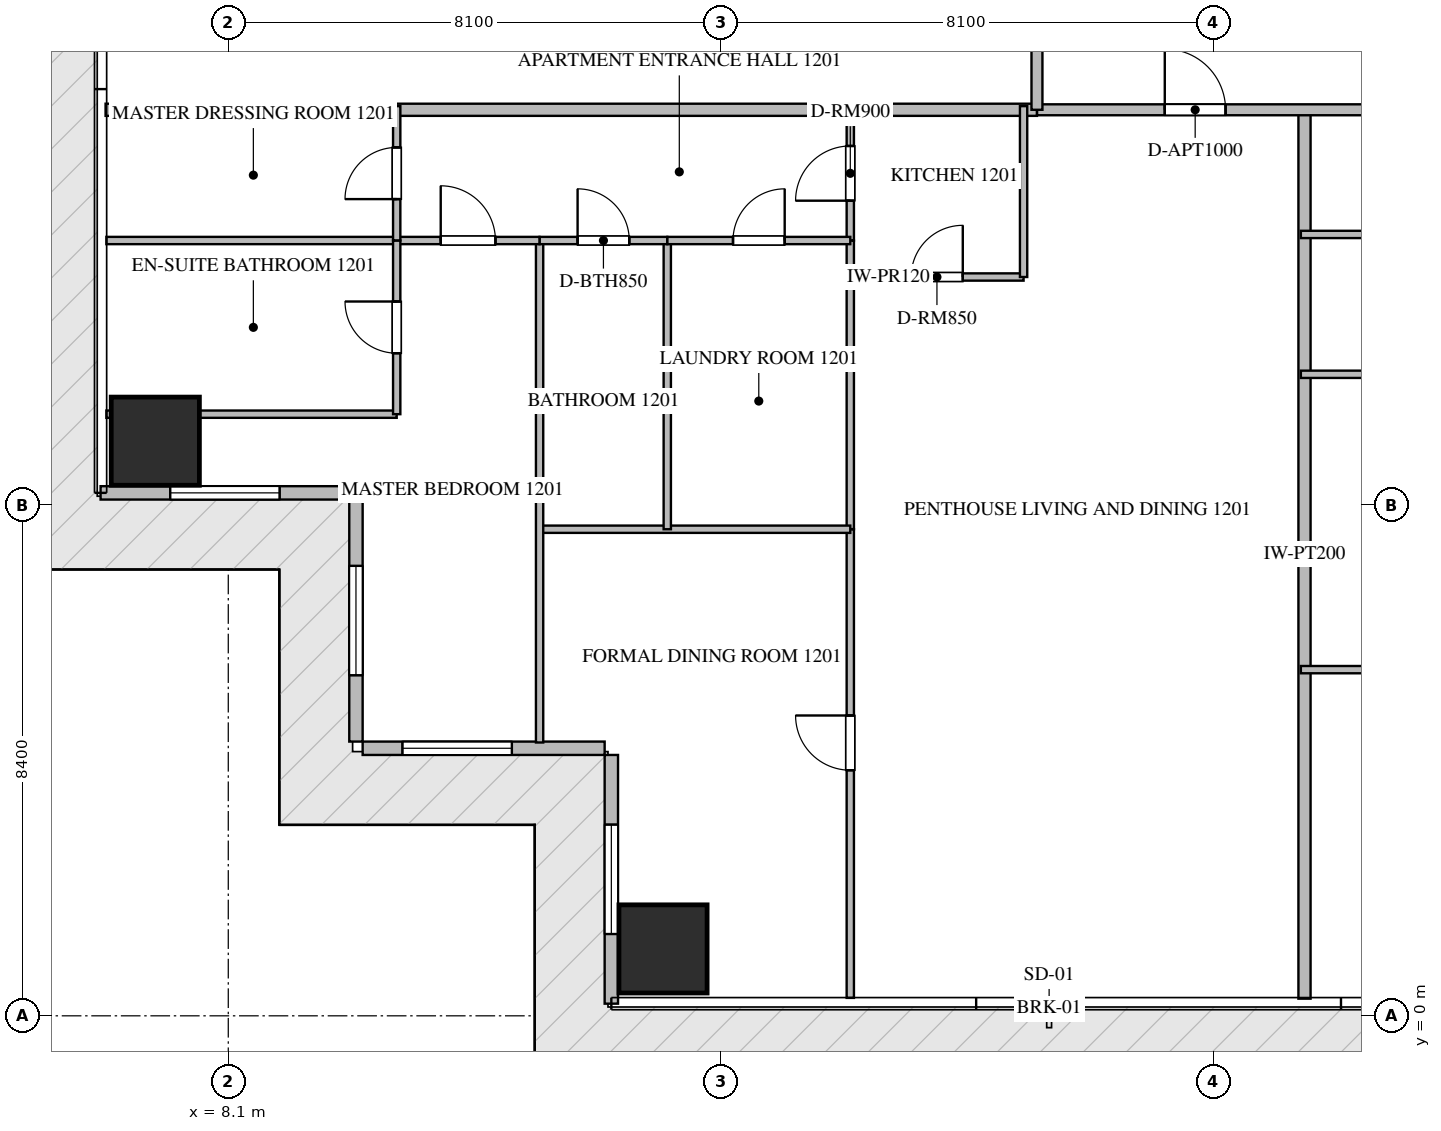
"""IFC4 building model, lengths in metres.
Left out: names, types, materials, properties, quantities, classifications, styles, units other than length and angle.
Written with IfcOpenShell. Run it as: python <this file> out.ifc"""

import sys

from ifc_helpers import new_model, si_unit, direction, frame, frame_2d, origin, origin_2d, place, context, subcontext, project, spatial, rectangle, extrude, source, transform, mapped, element, fill, save


model = new_model("IFC4")
c1 = context("Model", 3, precision=1e-05, world=origin(), true_north=direction((0.0, 1.0)))
c2 = subcontext(c1, "Body", "Model", "MODEL_VIEW")
j1 = project(units=[si_unit("LENGTHUNIT", "METRE"), si_unit("PLANEANGLEUNIT", "RADIAN")], contexts=[c1])
p1 = place(None, origin())
s1 = spatial("IfcSite", under=j1, at=p1, CompositionType="ELEMENT")
p2 = place(p1, origin())
s2 = spatial("IfcBuilding", under=s1, at=p2, CompositionType="ELEMENT")
p3 = place(p2, frame((0.0, 0.0, 52.95)))
s3 = spatial("IfcBuildingStorey", under=s2, at=p3, CompositionType="ELEMENT", Elevation=52.95)
m1 = source(origin(), c2, "Body", "SweptSolid", [
    extrude(rectangle(XDim=1.45, YDim=1.45, at=origin_2d()), origin(), (0.0, 0.0, 1.0), 3.75),
])
for number, where, z_axis, x_axis in (
    (1, (15.25, 1.1, -0.26), (0.0, 0.0, 1.0), (1.0, 0.0, 0.0)),
    (2, (6.9, 9.45, -0.26), (0.0, 0.0, 1.0), (1.0, 0.0, 0.0)),
):
    element("IfcColumn", number, at=place(p3, frame(where, z_axis=z_axis, x_axis=x_axis)), inside=s3, PredefinedType="COLUMN", context=c2, shape_type="MappedRepresentation", body=[
        mapped(m1, transform((0.0, 0.0, 0.0), scale=1.0)),
    ])
p4 = place(p3, frame((6.0, 8.6, 0.0), z_axis=(0.0, 0.0, 1.0), x_axis=(1.0, 0.0, 0.0)))
e3 = element("IfcWall", 3, at=p4, inside=s3, PredefinedType="ELEMENTEDWALL", context=c2, shape_type="SweptSolid", body=[
    extrude(rectangle(XDim=4.09, YDim=0.22, at=frame_2d((2.045, 0.0))), origin(), (0.0, 0.0, 1.0), 3.475),
])
p5 = place(p4, frame((1.145, 0.0, 0.65)))
e4 = element("IfcOpeningElement", 4, at=p5, cuts=e3, PredefinedType="OPENING", context=c2, shape_type="SweptSolid", body=[
    extrude(rectangle(XDim=1.8, YDim=2.1, at=frame_2d((0.9, 1.05))), frame((0.0, 0.12, 0.0), z_axis=(0.0, -1.0, 0.0), x_axis=(1.0, 0.0, 0.0)), (0.0, 0.0, 1.0), 0.24),
])
p6 = place(p3, frame((10.2, 8.49, 0.0), z_axis=(0.0, 0.0, 1.0), x_axis=(0.0, -1.0, 0.0)))
e5 = element("IfcWall", 5, at=p6, inside=s3, PredefinedType="ELEMENTEDWALL", context=c2, shape_type="SweptSolid", body=[
    extrude(rectangle(XDim=3.98, YDim=0.22, at=frame_2d((1.99, 0.0))), origin(), (0.0, 0.0, 1.0), 3.475),
])
p7 = place(p6, frame((1.09, 0.0, 0.65)))
e6 = element("IfcOpeningElement", 6, at=p7, cuts=e5, PredefinedType="OPENING", context=c2, shape_type="SweptSolid", body=[
    extrude(rectangle(XDim=1.8, YDim=2.1, at=frame_2d((0.9, 1.05))), frame((0.0, 0.12, 0.0), z_axis=(0.0, -1.0, 0.0), x_axis=(1.0, 0.0, 0.0)), (0.0, 0.0, 1.0), 0.24),
])
p8 = place(p3, frame((10.31, 4.4, 0.0), z_axis=(0.0, 0.0, 1.0), x_axis=(1.0, 0.0, 0.0)))
e7 = element("IfcWall", 7, at=p8, inside=s3, PredefinedType="ELEMENTEDWALL", context=c2, shape_type="SweptSolid", body=[
    extrude(rectangle(XDim=3.98, YDim=0.22, at=frame_2d((1.99, 0.0))), origin(), (0.0, 0.0, 1.0), 3.475),
])
p9 = place(p8, frame((0.654, 0.0, 0.65)))
e8 = element("IfcOpeningElement", 8, at=p9, cuts=e7, PredefinedType="OPENING", context=c2, shape_type="SweptSolid", body=[
    extrude(rectangle(XDim=1.8, YDim=2.1, at=frame_2d((0.9, 1.05))), frame((0.0, 0.12, 0.0), z_axis=(0.0, -1.0, 0.0), x_axis=(1.0, 0.0, 0.0)), (0.0, 0.0, 1.0), 0.24),
])
p10 = place(p3, frame((14.4, 4.29, 0.0), z_axis=(0.0, 0.0, 1.0), x_axis=(0.0, -1.0, 0.0)))
e9 = element("IfcWall", 9, at=p10, inside=s3, PredefinedType="ELEMENTEDWALL", context=c2, shape_type="SweptSolid", body=[
    extrude(rectangle(XDim=4.09, YDim=0.22, at=frame_2d((2.045, 0.0))), origin(), (0.0, 0.0, 1.0), 3.475),
])
p11 = place(p10, frame((1.145, 0.0, 0.65)))
e10 = element("IfcOpeningElement", 10, at=p11, cuts=e9, PredefinedType="OPENING", context=c2, shape_type="SweptSolid", body=[
    extrude(rectangle(XDim=1.8, YDim=2.1, at=frame_2d((0.9, 1.05))), frame((0.0, 0.12, 0.0), z_axis=(0.0, -1.0, 0.0), x_axis=(1.0, 0.0, 0.0)), (0.0, 0.0, 1.0), 0.24),
])
p12 = place(p3, frame((25.8, 0.282, 0.0), z_axis=(0.0, 0.0, 1.0), x_axis=(0.0, 1.0, 0.0)))
e11 = element("IfcWall", 11, at=p12, inside=s3, PredefinedType="PARTITIONING", context=c2, shape_type="SweptSolid", body=[
    extrude(rectangle(XDim=14.618, YDim=0.2, at=frame_2d((7.309, 0.0))), origin(), (0.0, 0.0, 1.0), 3.49),
])
p13 = place(p3, frame((6.082, 14.9, 0.0), z_axis=(0.0, 0.0, 1.0), x_axis=(1.0, 0.0, 0.0)))
e12 = element("IfcWall", 12, at=p13, inside=s3, PredefinedType="PARTITIONING", context=c2, shape_type="SweptSolid", body=[
    extrude(rectangle(XDim=15.318, YDim=0.2, at=frame_2d((7.659, 0.0))), origin(), (0.0, 0.0, 1.0), 3.49),
])
p14 = place(p3, frame((21.402, 14.9, 0.0), z_axis=(0.0, 0.0, 1.0), x_axis=(1.0, 0.0, 0.0)))
e13 = element("IfcWall", 13, at=p14, inside=s3, PredefinedType="PARTITIONING", context=c2, shape_type="SweptSolid", body=[
    extrude(rectangle(XDim=21.996, YDim=0.18, at=frame_2d((10.998, 0.0))), origin(), (0.0, 0.0, 1.0), 3.49),
])
p15 = place(p14, frame((2.1, 0.0, 0.0)))
e14 = element("IfcOpeningElement", 14, at=p15, cuts=e13, PredefinedType="OPENING", context=c2, shape_type="SweptSolid", body=[
    extrude(rectangle(XDim=1.0, YDim=2.15, at=frame_2d((0.5, 1.075))), frame((0.0, 0.1, 0.0), z_axis=(0.0, -1.0, 0.0), x_axis=(1.0, 0.0, 0.0)), (0.0, 0.0, 1.0), 0.2),
])
p16 = place(p14, frame((14.172, 0.0, 0.0)))
e15 = element("IfcOpeningElement", 15, at=p16, cuts=e13, PredefinedType="OPENING", context=c2, shape_type="SweptSolid", body=[
    extrude(rectangle(XDim=1.0, YDim=2.15, at=frame_2d((0.5, 1.075))), frame((0.0, 0.1, 0.0), z_axis=(0.0, -1.0, 0.0), x_axis=(1.0, 0.0, 0.0)), (0.0, 0.0, 1.0), 0.2),
])
p17 = place(p14, frame((18.896, 0.0, 0.0)))
e16 = element("IfcOpeningElement", 16, at=p17, cuts=e13, PredefinedType="OPENING", context=c2, shape_type="SweptSolid", body=[
    extrude(rectangle(XDim=1.0, YDim=2.15, at=frame_2d((0.5, 1.075))), frame((0.0, 0.1, 0.0), z_axis=(0.0, -1.0, 0.0), x_axis=(1.0, 0.0, 0.0)), (0.0, 0.0, 1.0), 0.2),
])
p18 = place(p3, frame((21.4, 14.9, 0.0), z_axis=(0.0, 0.0, 1.0), x_axis=(0.0, 1.0, 0.0)))
e17 = element("IfcWall", 17, at=p18, inside=s3, PredefinedType="PARTITIONING", context=c2, shape_type="SweptSolid", body=[
    extrude(rectangle(XDim=20.6, YDim=0.18, at=frame_2d((10.3, 0.0))), origin(), (0.0, 0.0, 1.0), 3.49),
])
p19 = place(p18, frame((1.96, 0.0, 0.0)))
e18 = element("IfcOpeningElement", 18, at=p19, cuts=e17, PredefinedType="OPENING", context=c2, shape_type="SweptSolid", body=[
    extrude(rectangle(XDim=1.0, YDim=2.15, at=frame_2d((0.5, 1.075))), frame((0.0, 0.1, 0.0), z_axis=(0.0, -1.0, 0.0), x_axis=(1.0, 0.0, 0.0)), (0.0, 0.0, 1.0), 0.2),
])
p20 = place(p3, frame((18.33, 12.15, 0.0), z_axis=(0.0, 0.0, 1.0), x_axis=(1.0, 0.0, 0.0)))
e19 = element("IfcWall", 19, at=p20, inside=s3, PredefinedType="PARTITIONING", context=c2, shape_type="SweptSolid", body=[
    extrude(rectangle(XDim=2.85, YDim=0.12, at=frame_2d((1.425, 0.0))), origin(), (0.0, 0.0, 1.0), 3.49),
])
p21 = place(p20, frame((1.0, 0.0, 0.0)))
e20 = element("IfcOpeningElement", 20, at=p21, cuts=e19, PredefinedType="OPENING", context=c2, shape_type="SweptSolid", body=[
    extrude(rectangle(XDim=0.85, YDim=2.1, at=frame_2d((0.425, 1.05))), frame((0.0, 0.07, 0.0), z_axis=(0.0, -1.0, 0.0), x_axis=(1.0, 0.0, 0.0)), (0.0, 0.0, 1.0), 0.14),
])
p22 = place(p3, frame((21.18, 12.15, 0.0), z_axis=(0.0, 0.0, 1.0), x_axis=(0.0, 1.0, 0.0)))
e21 = element("IfcWall", 21, at=p22, inside=s3, PredefinedType="PARTITIONING", context=c2, shape_type="SweptSolid", body=[
    extrude(rectangle(XDim=2.81, YDim=0.12, at=frame_2d((1.405, 0.0))), origin(), (0.0, 0.0, 1.0), 3.49),
])
p23 = place(p3, frame((18.33, 12.75, 0.0), z_axis=(0.0, 0.0, 1.0), x_axis=(0.0, 1.0, 0.0)))
e22 = element("IfcWall", 22, at=p23, inside=s3, PredefinedType="PARTITIONING", context=c2, shape_type="SweptSolid", body=[
    extrude(rectangle(XDim=2.21, YDim=0.12, at=frame_2d((1.105, 0.0))), origin(), (0.0, 0.0, 1.0), 3.49),
])
p24 = place(p23, frame((0.655, 0.0, 0.0)))
e23 = element("IfcOpeningElement", 23, at=p24, cuts=e22, PredefinedType="OPENING", context=c2, shape_type="SweptSolid", body=[
    extrude(rectangle(XDim=0.9, YDim=2.1, at=frame_2d((0.45, 1.05))), frame((0.0, 0.07, 0.0), z_axis=(0.0, -1.0, 0.0), x_axis=(1.0, 0.0, 0.0)), (0.0, 0.0, 1.0), 0.14),
])
p25 = place(p3, frame((18.33, 0.295, 0.0), z_axis=(0.0, 0.0, 1.0), x_axis=(0.0, 1.0, 0.0)))
e24 = element("IfcWall", 24, at=p25, inside=s3, PredefinedType="PARTITIONING", context=c2, shape_type="SweptSolid", body=[
    extrude(rectangle(XDim=7.707, YDim=0.12, at=frame_2d((3.854, 0.0))), origin(), (0.0, 0.0, 1.0), 3.49),
])
p26 = place(p25, frame((3.744, 0.0, 0.0)))
e25 = element("IfcOpeningElement", 25, at=p26, cuts=e24, PredefinedType="OPENING", context=c2, shape_type="SweptSolid", body=[
    extrude(rectangle(XDim=0.9, YDim=2.1, at=frame_2d((0.45, 1.05))), frame((0.0, 0.07, 0.0), z_axis=(0.0, -1.0, 0.0), x_axis=(1.0, 0.0, 0.0)), (0.0, 0.0, 1.0), 0.14),
])
p27 = place(p3, frame((18.33, 8.004, 0.0), z_axis=(0.0, 0.0, 1.0), x_axis=(0.0, 1.0, 0.0)))
e26 = element("IfcWall", 26, at=p27, inside=s3, PredefinedType="PARTITIONING", context=c2, shape_type="SweptSolid", body=[
    extrude(rectangle(XDim=4.744, YDim=0.12, at=frame_2d((2.372, 0.0))), origin(), (0.0, 0.0, 1.0), 3.49),
])
p28 = place(p3, frame((13.22, 8.002, 0.0), z_axis=(0.0, 0.0, 1.0), x_axis=(1.0, 0.0, 0.0)))
e27 = element("IfcWall", 27, at=p28, inside=s3, PredefinedType="PARTITIONING", context=c2, shape_type="SweptSolid", body=[
    extrude(rectangle(XDim=5.11, YDim=0.12, at=frame_2d((2.555, 0.0))), origin(), (0.0, 0.0, 1.0), 3.49),
])
p29 = place(p3, frame((13.22, 4.495, 0.0), z_axis=(0.0, 0.0, 1.0), x_axis=(0.0, 1.0, 0.0)))
e28 = element("IfcWall", 28, at=p29, inside=s3, PredefinedType="PARTITIONING", context=c2, shape_type="SweptSolid", body=[
    extrude(rectangle(XDim=8.255, YDim=0.12, at=frame_2d((4.127, 0.0))), origin(), (0.0, 0.0, 1.0), 3.49),
])
p30 = place(p3, frame((15.32, 8.002, 0.0), z_axis=(0.0, 0.0, 1.0), x_axis=(0.0, 1.0, 0.0)))
e29 = element("IfcWall", 29, at=p30, inside=s3, PredefinedType="PARTITIONING", context=c2, shape_type="SweptSolid", body=[
    extrude(rectangle(XDim=4.748, YDim=0.12, at=frame_2d((2.374, 0.0))), origin(), (0.0, 0.0, 1.0), 2.922),
])
p31 = place(p3, frame((13.22, 12.75, 0.0), z_axis=(0.0, 0.0, 1.0), x_axis=(1.0, 0.0, 0.0)))
e30 = element("IfcWall", 30, at=p31, inside=s3, PredefinedType="PARTITIONING", context=c2, shape_type="SweptSolid", body=[
    extrude(rectangle(XDim=2.1, YDim=0.12, at=frame_2d((1.05, 0.0))), origin(), (0.0, 0.0, 1.0), 3.49),
])
p32 = place(p31, frame((0.625, 0.0, 0.0)))
e31 = element("IfcOpeningElement", 31, at=p32, cuts=e30, PredefinedType="OPENING", context=c2, shape_type="SweptSolid", body=[
    extrude(rectangle(XDim=0.85, YDim=2.1, at=frame_2d((0.425, 1.05))), frame((0.0, 0.07, 0.0), z_axis=(0.0, -1.0, 0.0), x_axis=(1.0, 0.0, 0.0)), (0.0, 0.0, 1.0), 0.14),
])
p33 = place(p3, frame((15.322, 12.75, 0.0), z_axis=(0.0, 0.0, 1.0), x_axis=(1.0, 0.0, 0.0)))
e32 = element("IfcWall", 32, at=p33, inside=s3, PredefinedType="PARTITIONING", context=c2, shape_type="SweptSolid", body=[
    extrude(rectangle(XDim=3.008, YDim=0.12, at=frame_2d((1.504, 0.0))), origin(), (0.0, 0.0, 1.0), 3.49),
])
p34 = place(p33, frame((1.079, 0.0, 0.0)))
e33 = element("IfcOpeningElement", 33, at=p34, cuts=e32, PredefinedType="OPENING", context=c2, shape_type="SweptSolid", body=[
    extrude(rectangle(XDim=0.85, YDim=2.1, at=frame_2d((0.425, 1.05))), frame((0.0, 0.07, 0.0), z_axis=(0.0, -1.0, 0.0), x_axis=(1.0, 0.0, 0.0)), (0.0, 0.0, 1.0), 0.14),
])
p35 = place(p3, frame((10.87, 12.75, 0.0), z_axis=(0.0, 0.0, 1.0), x_axis=(1.0, 0.0, 0.0)))
e34 = element("IfcWall", 34, at=p35, inside=s3, PredefinedType="PARTITIONING", context=c2, shape_type="SweptSolid", body=[
    extrude(rectangle(XDim=2.348, YDim=0.12, at=frame_2d((1.174, 0.0))), origin(), (0.0, 0.0, 1.0), 3.49),
])
p36 = place(p35, frame((0.724, 0.0, 0.0)))
e35 = element("IfcOpeningElement", 35, at=p36, cuts=e34, PredefinedType="OPENING", context=c2, shape_type="SweptSolid", body=[
    extrude(rectangle(XDim=0.9, YDim=2.1, at=frame_2d((0.45, 1.05))), frame((0.0, 0.07, 0.0), z_axis=(0.0, -1.0, 0.0), x_axis=(1.0, 0.0, 0.0)), (0.0, 0.0, 1.0), 0.14),
])
p37 = place(p3, frame((6.095, 9.894, 0.0), z_axis=(0.0, 0.0, 1.0), x_axis=(1.0, 0.0, 0.0)))
e36 = element("IfcWall", 36, at=p37, inside=s3, PredefinedType="PARTITIONING", context=c2, shape_type="SweptSolid", body=[
    extrude(rectangle(XDim=4.775, YDim=0.12, at=frame_2d((2.388, 0.0))), origin(), (0.0, 0.0, 1.0), 3.49),
])
p38 = place(p3, frame((6.095, 12.75, 0.0), z_axis=(0.0, 0.0, 1.0), x_axis=(1.0, 0.0, 0.0)))
e37 = element("IfcWall", 37, at=p38, inside=s3, PredefinedType="PARTITIONING", context=c2, shape_type="SweptSolid", body=[
    extrude(rectangle(XDim=4.773, YDim=0.12, at=frame_2d((2.386, 0.0))), origin(), (0.0, 0.0, 1.0), 3.49),
])
p39 = place(p3, frame((10.87, 9.894, 0.0), z_axis=(0.0, 0.0, 1.0), x_axis=(0.0, 1.0, 0.0)))
e38 = element("IfcWall", 38, at=p39, inside=s3, PredefinedType="PARTITIONING", context=c2, shape_type="SweptSolid", body=[
    extrude(rectangle(XDim=2.856, YDim=0.12, at=frame_2d((1.428, 0.0))), origin(), (0.0, 0.0, 1.0), 3.49),
])
p40 = place(p39, frame((1.003, 0.0, 0.0)))
e39 = element("IfcOpeningElement", 39, at=p40, cuts=e38, PredefinedType="OPENING", context=c2, shape_type="SweptSolid", body=[
    extrude(rectangle(XDim=0.85, YDim=2.1, at=frame_2d((0.425, 1.05))), frame((0.0, 0.07, 0.0), z_axis=(0.0, -1.0, 0.0), x_axis=(1.0, 0.0, 0.0)), (0.0, 0.0, 1.0), 0.14),
])
p41 = place(p3, frame((10.87, 12.752, 0.0), z_axis=(0.0, 0.0, 1.0), x_axis=(0.0, 1.0, 0.0)))
e40 = element("IfcWall", 40, at=p41, inside=s3, PredefinedType="PARTITIONING", context=c2, shape_type="SweptSolid", body=[
    extrude(rectangle(XDim=2.208, YDim=0.12, at=frame_2d((1.104, 0.0))), origin(), (0.0, 0.0, 1.0), 3.49),
])
p42 = place(p41, frame((0.679, 0.0, 0.0)))
e41 = element("IfcOpeningElement", 41, at=p42, cuts=e40, PredefinedType="OPENING", context=c2, shape_type="SweptSolid", body=[
    extrude(rectangle(XDim=0.85, YDim=2.1, at=frame_2d((0.425, 1.05))), frame((0.0, 0.07, 0.0), z_axis=(0.0, -1.0, 0.0), x_axis=(1.0, 0.0, 0.0)), (0.0, 0.0, 1.0), 0.14),
])
for number, where, z_axis, x_axis in (
    (42, (25.74, 5.693, 0.0), (0.0, 0.0, 1.0), (1.0, 0.0, 0.0)),
    (43, (25.74, 10.55, 0.0), (0.0, 0.0, 1.0), (1.0, 0.0, 0.0)),
    (44, (25.74, 12.85, 0.0), (0.0, 0.0, 1.0), (1.0, 0.0, 0.0)),
):
    element("IfcWall", number, at=place(p3, frame(where, z_axis=z_axis, x_axis=x_axis)), inside=s3, PredefinedType="PARTITIONING", context=c2, shape_type="SweptSolid", body=[
        extrude(rectangle(XDim=7.93, YDim=0.12, at=frame_2d((3.965, 0.0))), origin(), (0.0, 0.0, 1.0), 3.49),
    ])
m2 = source(origin(), c2, "Body", "SweptSolid", [
    extrude(rectangle(XDim=1.8, YDim=2.1, at=frame_2d((0.9, 1.05))), frame((0.0, 0.03, 0.0), z_axis=(0.0, -1.0, 0.0), x_axis=(1.0, 0.0, 0.0)), (0.0, 0.0, 1.0), 0.06),
])
p43 = place(p5, origin())
e45 = element("IfcWindow", 45, at=p43, inside=s3, PartitioningType="SINGLE_PANEL", PredefinedType="WINDOW", context=c2, shape_type="MappedRepresentation", body=[
    mapped(m2, transform((0.0, 0.0, 0.0), scale=1.0)),
])
fill(e4, e45)
p44 = place(p7, origin())
e46 = element("IfcWindow", 46, at=p44, inside=s3, PartitioningType="SINGLE_PANEL", PredefinedType="WINDOW", context=c2, shape_type="MappedRepresentation", body=[
    mapped(m2, transform((0.0, 0.0, 0.0), scale=1.0)),
])
fill(e6, e46)
p45 = place(p9, origin())
e47 = element("IfcWindow", 47, at=p45, inside=s3, PartitioningType="SINGLE_PANEL", PredefinedType="WINDOW", context=c2, shape_type="MappedRepresentation", body=[
    mapped(m2, transform((0.0, 0.0, 0.0), scale=1.0)),
])
fill(e8, e47)
p46 = place(p11, origin())
e48 = element("IfcWindow", 48, at=p46, inside=s3, PartitioningType="SINGLE_PANEL", PredefinedType="WINDOW", context=c2, shape_type="MappedRepresentation", body=[
    mapped(m2, transform((0.0, 0.0, 0.0), scale=1.0)),
])
fill(e10, e48)
m3 = source(origin(), c2, "Body", "SweptSolid", [
    extrude(rectangle(XDim=1.0, YDim=2.15, at=frame_2d((0.5, 1.075))), frame((0.0, 0.025, 0.0), z_axis=(0.0, -1.0, 0.0), x_axis=(1.0, 0.0, 0.0)), (0.0, 0.0, 1.0), 0.05),
])
p47 = place(p15, origin())
e49 = element("IfcDoor", 49, at=p47, inside=s3, OperationType="SINGLE_SWING_LEFT", PredefinedType="DOOR", context=c2, shape_type="MappedRepresentation", body=[
    mapped(m3, transform((0.0, 0.0, 0.0), scale=1.0)),
])
fill(e14, e49)
m4 = source(origin(), c2, "Body", "SweptSolid", [
    extrude(rectangle(XDim=0.85, YDim=2.1, at=frame_2d((0.425, 1.05))), frame((0.0, 0.025, 0.0), z_axis=(0.0, -1.0, 0.0), x_axis=(1.0, 0.0, 0.0)), (0.0, 0.0, 1.0), 0.05),
])
p48 = place(p21, origin())
e50 = element("IfcDoor", 50, at=p48, inside=s3, OperationType="SINGLE_SWING_RIGHT", PredefinedType="DOOR", context=c2, shape_type="MappedRepresentation", body=[
    mapped(m4, transform((0.0, 0.0, 0.0), scale=1.0)),
])
fill(e20, e50)
m5 = source(origin(), c2, "Body", "SweptSolid", [
    extrude(rectangle(XDim=0.9, YDim=2.1, at=frame_2d((0.45, 1.05))), frame((0.0, 0.025, 0.0), z_axis=(0.0, -1.0, 0.0), x_axis=(1.0, 0.0, 0.0)), (0.0, 0.0, 1.0), 0.05),
])
p49 = place(p24, origin())
e51 = element("IfcDoor", 51, at=p49, inside=s3, OperationType="SINGLE_SWING_LEFT", PredefinedType="DOOR", context=c2, shape_type="MappedRepresentation", body=[
    mapped(m5, transform((0.0, 0.0, 0.0), scale=1.0)),
])
fill(e23, e51)
p50 = place(p26, origin())
e52 = element("IfcDoor", 52, at=p50, inside=s3, OperationType="SINGLE_SWING_RIGHT", PredefinedType="DOOR", context=c2, shape_type="MappedRepresentation", body=[
    mapped(m5, transform((0.0, 0.0, 0.0), scale=1.0)),
])
fill(e25, e52)
p51 = place(p32, origin())
e53 = element("IfcDoor", 53, at=p51, inside=s3, OperationType="SINGLE_SWING_LEFT", PredefinedType="DOOR", context=c2, shape_type="MappedRepresentation", body=[
    mapped(m4, transform((0.0, 0.0, 0.0), scale=1.0)),
])
fill(e31, e53)
p52 = place(p34, origin())
e54 = element("IfcDoor", 54, at=p52, inside=s3, OperationType="SINGLE_SWING_RIGHT", PredefinedType="DOOR", context=c2, shape_type="MappedRepresentation", body=[
    mapped(m4, transform((0.0, 0.0, 0.0), scale=1.0)),
])
fill(e33, e54)
p53 = place(p36, origin())
e55 = element("IfcDoor", 55, at=p53, inside=s3, OperationType="SINGLE_SWING_LEFT", PredefinedType="DOOR", context=c2, shape_type="MappedRepresentation", body=[
    mapped(m5, transform((0.0, 0.0, 0.0), scale=1.0)),
])
fill(e35, e55)
p54 = place(p40, origin())
e56 = element("IfcDoor", 56, at=p54, inside=s3, OperationType="SINGLE_SWING_RIGHT", PredefinedType="DOOR", context=c2, shape_type="MappedRepresentation", body=[
    mapped(m4, transform((0.0, 0.0, 0.0), scale=1.0)),
])
fill(e39, e56)
p55 = place(p42, origin())
e57 = element("IfcDoor", 57, at=p55, inside=s3, OperationType="SINGLE_SWING_LEFT", PredefinedType="DOOR", context=c2, shape_type="MappedRepresentation", body=[
    mapped(m4, transform((0.0, 0.0, 0.0), scale=1.0)),
])
fill(e41, e57)
save(model, sys.argv[1])
